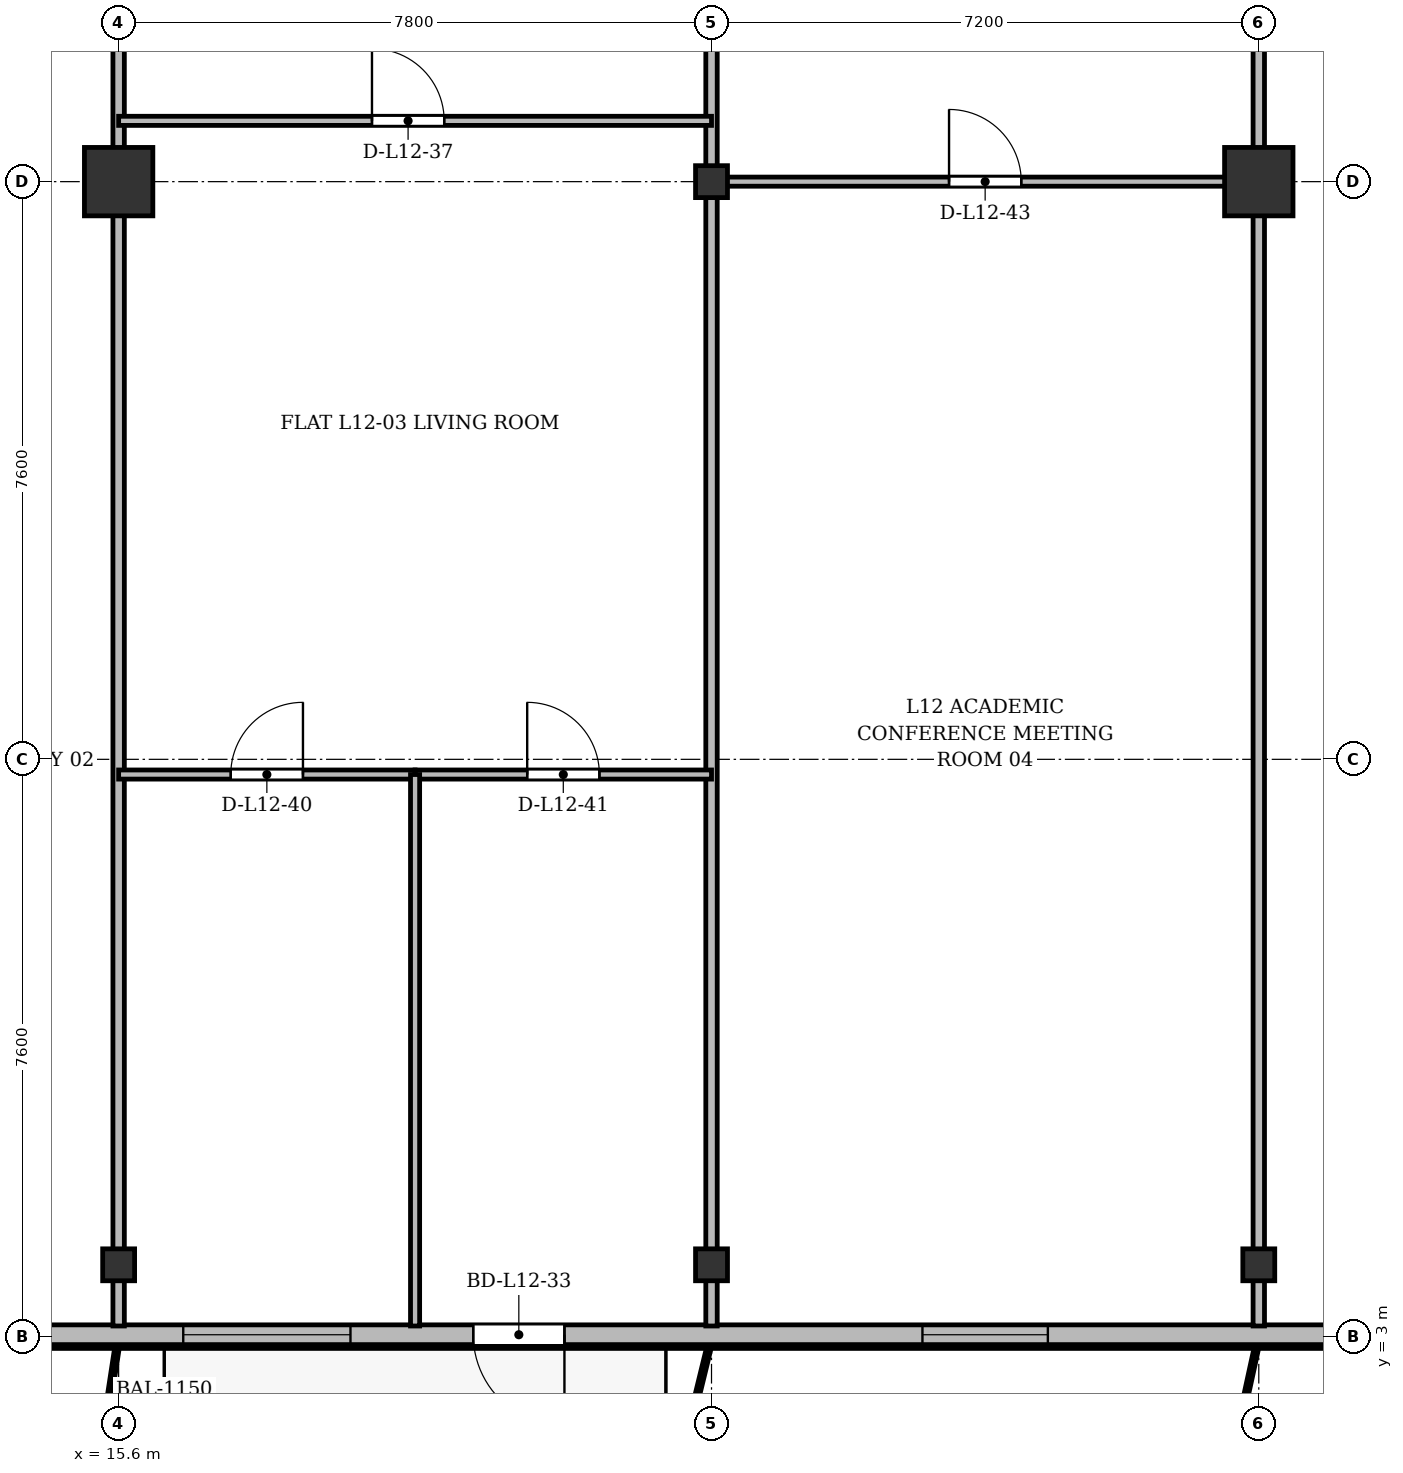
"""IFC4 building model, lengths in metres.
Left out: names, types, materials, properties, quantities, classifications, styles, units other than length and angle.
Written with IfcOpenShell. Run it as: python <this file> out.ifc"""

import sys

from ifc_helpers import new_model, si_unit, direction, frame, frame_2d, origin, origin_2d, place, context, subcontext, project, spatial, rectangle, i_section, extrude, source, transform, mapped, element, fill, save


model = new_model("IFC4")
c1 = context("Model", 3, precision=1e-05, world=origin(), true_north=direction((0.0, 1.0)))
c2 = subcontext(c1, "Body", "Model", "MODEL_VIEW")
j1 = project(units=[si_unit("LENGTHUNIT", "METRE"), si_unit("PLANEANGLEUNIT", "RADIAN")], contexts=[c1])
p1 = place(None, origin())
s1 = spatial("IfcSite", under=j1, at=p1, CompositionType="ELEMENT")
p2 = place(p1, origin())
s2 = spatial("IfcBuilding", under=s1, at=p2, CompositionType="ELEMENT")
p3 = place(p2, frame((0.0, 0.0, 48.7)))
s3 = spatial("IfcBuildingStorey", under=s2, at=p3, CompositionType="ELEMENT", Elevation=48.7)
m1 = source(origin(), c2, "Body", "SweptSolid", [
    extrude(i_section(OverallWidth=0.42, OverallDepth=0.42, WebThickness=0.026, FlangeThickness=0.04, at=origin_2d()), origin(), (0.0, 0.0, 1.0), 3.6),
])
p4 = place(p3, frame((15.6, 3.95, 0.0), z_axis=(0.0, 0.0, 1.0), x_axis=(1.0, 0.0, 0.0)))
e1 = element("IfcColumn", 1, at=p4, inside=s3, PredefinedType="COLUMN", context=c2, shape_type="MappedRepresentation", body=[
    mapped(m1, transform((0.0, 0.0, 0.0), x_axis=(1.0, 0.0, 0.0), y_axis=(0.0, 1.0, 0.0), z_axis=(0.0, 0.0, 1.0), scale=1.0)),
])
m2 = source(origin(), c2, "Body", "SweptSolid", [
    extrude(rectangle(XDim=0.9, YDim=0.9, at=origin_2d()), origin(), (0.0, 0.0, 1.0), 3.6),
])
p5 = place(p3, frame((15.6, 18.2, 0.0), z_axis=(0.0, 0.0, 1.0), x_axis=(1.0, 0.0, 0.0)))
e2 = element("IfcColumn", 2, at=p5, inside=s3, PredefinedType="COLUMN", context=c2, shape_type="MappedRepresentation", body=[
    mapped(m2, transform((0.0, 0.0, 0.0), x_axis=(1.0, 0.0, 0.0), y_axis=(0.0, 1.0, 0.0), z_axis=(0.0, 0.0, 1.0), scale=1.0)),
])
for number, where, z_axis, x_axis in (
    (3, (23.4, 3.95, 0.0), (0.0, 0.0, 1.0), (1.0, 0.0, 0.0)),
    (4, (23.4, 18.2, 0.0), (0.0, 0.0, 1.0), (1.0, 0.0, 0.0)),
    (5, (30.6, 3.95, 0.0), (0.0, 0.0, 1.0), (1.0, 0.0, 0.0)),
):
    element("IfcColumn", number, at=place(p3, frame(where, z_axis=z_axis, x_axis=x_axis)), inside=s3, PredefinedType="COLUMN", context=c2, shape_type="MappedRepresentation", body=[
        mapped(m1, transform((0.0, 0.0, 0.0), x_axis=(1.0, 0.0, 0.0), y_axis=(0.0, 1.0, 0.0), z_axis=(0.0, 0.0, 1.0), scale=1.0)),
    ])
p6 = place(p3, frame((30.6, 18.2, 0.0), z_axis=(0.0, 0.0, 1.0), x_axis=(1.0, 0.0, 0.0)))
e6 = element("IfcColumn", 6, at=p6, inside=s3, PredefinedType="COLUMN", context=c2, shape_type="MappedRepresentation", body=[
    mapped(m2, transform((0.0, 0.0, 0.0), x_axis=(1.0, 0.0, 0.0), y_axis=(0.0, 1.0, 0.0), z_axis=(0.0, 0.0, 1.0), scale=1.0)),
])
p7 = place(p3, frame((66.9, 3.03, 0.0), z_axis=(0.0, 0.0, 1.0), x_axis=(-1.0, 0.0, 0.0)))
e7 = element("IfcWall", 7, at=p7, inside=s3, PredefinedType="SOLIDWALL", context=c2, shape_type="SweptSolid", body=[
    extrude(rectangle(XDim=59.4, YDim=0.26, at=frame_2d((29.7, 0.0))), origin(), (0.0, 0.0, 1.0), 3.34),
])
p8 = place(p7, frame((0.745, 0.0, 0.9)))
e8 = element("IfcOpeningElement", 8, at=p8, cuts=e7, PredefinedType="OPENING", context=c2, shape_type="SweptSolid", body=[
    extrude(rectangle(XDim=1.5, YDim=1.75, at=frame_2d((0.75, 0.875))), frame((0.0, 0.14, 0.0), z_axis=(0.0, -1.0, 0.0), x_axis=(1.0, 0.0, 0.0)), (0.0, 0.0, 1.0), 0.28),
])
p9 = place(p7, frame((4.5, 0.0, 0.9)))
e9 = element("IfcOpeningElement", 9, at=p9, cuts=e7, PredefinedType="OPENING", context=c2, shape_type="SweptSolid", body=[
    extrude(rectangle(XDim=2.0, YDim=1.95, at=frame_2d((1.0, 0.975))), frame((0.0, 0.14, 0.0), z_axis=(0.0, -1.0, 0.0), x_axis=(1.0, 0.0, 0.0)), (0.0, 0.0, 1.0), 0.28),
])
p10 = place(p7, frame((11.175, 0.0, 0.9)))
e10 = element("IfcOpeningElement", 10, at=p10, cuts=e7, PredefinedType="OPENING", context=c2, shape_type="SweptSolid", body=[
    extrude(rectangle(XDim=1.65, YDim=1.85, at=frame_2d((0.825, 0.925))), frame((0.0, 0.14, 0.0), z_axis=(0.0, -1.0, 0.0), x_axis=(1.0, 0.0, 0.0)), (0.0, 0.0, 1.0), 0.28),
])
p11 = place(p7, frame((17.007, 0.0, 0.0)))
e11 = element("IfcOpeningElement", 11, at=p11, cuts=e7, PredefinedType="OPENING", context=c2, shape_type="SweptSolid", body=[
    extrude(rectangle(XDim=1.2, YDim=2.2, at=frame_2d((0.6, 1.1))), frame((0.0, 0.14, 0.0), z_axis=(0.0, -1.0, 0.0), x_axis=(1.0, 0.0, 0.0)), (0.0, 0.0, 1.0), 0.28),
])
p12 = place(p7, frame((20.2, 0.0, 0.9)))
e12 = element("IfcOpeningElement", 12, at=p12, cuts=e7, PredefinedType="OPENING", context=c2, shape_type="SweptSolid", body=[
    extrude(rectangle(XDim=2.2, YDim=1.8, at=frame_2d((1.1, 0.9))), frame((0.0, 0.14, 0.0), z_axis=(0.0, -1.0, 0.0), x_axis=(1.0, 0.0, 0.0)), (0.0, 0.0, 1.0), 0.28),
])
p13 = place(p7, frame((24.75, 0.0, 0.9)))
e13 = element("IfcOpeningElement", 13, at=p13, cuts=e7, PredefinedType="OPENING", context=c2, shape_type="SweptSolid", body=[
    extrude(rectangle(XDim=1.5, YDim=1.75, at=frame_2d((0.75, 0.875))), frame((0.0, 0.14, 0.0), z_axis=(0.0, -1.0, 0.0), x_axis=(1.0, 0.0, 0.0)), (0.0, 0.0, 1.0), 0.28),
])
p14 = place(p7, frame((31.1, 0.0, 0.9)))
e14 = element("IfcOpeningElement", 14, at=p14, cuts=e7, PredefinedType="OPENING", context=c2, shape_type="SweptSolid", body=[
    extrude(rectangle(XDim=2.0, YDim=1.95, at=frame_2d((1.0, 0.975))), frame((0.0, 0.14, 0.0), z_axis=(0.0, -1.0, 0.0), x_axis=(1.0, 0.0, 0.0)), (0.0, 0.0, 1.0), 0.28),
])
p15 = place(p7, frame((39.075, 0.0, 0.9)))
e15 = element("IfcOpeningElement", 15, at=p15, cuts=e7, PredefinedType="OPENING", context=c2, shape_type="SweptSolid", body=[
    extrude(rectangle(XDim=1.65, YDim=1.85, at=frame_2d((0.825, 0.925))), frame((0.0, 0.14, 0.0), z_axis=(0.0, -1.0, 0.0), x_axis=(1.0, 0.0, 0.0)), (0.0, 0.0, 1.0), 0.28),
])
p16 = place(p7, frame((45.435, 0.0, 0.0)))
e16 = element("IfcOpeningElement", 16, at=p16, cuts=e7, PredefinedType="OPENING", context=c2, shape_type="SweptSolid", body=[
    extrude(rectangle(XDim=1.2, YDim=2.2, at=frame_2d((0.6, 1.1))), frame((0.0, 0.14, 0.0), z_axis=(0.0, -1.0, 0.0), x_axis=(1.0, 0.0, 0.0)), (0.0, 0.0, 1.0), 0.28),
])
p17 = place(p7, frame((48.25, 0.0, 0.9)))
e17 = element("IfcOpeningElement", 17, at=p17, cuts=e7, PredefinedType="OPENING", context=c2, shape_type="SweptSolid", body=[
    extrude(rectangle(XDim=2.2, YDim=1.8, at=frame_2d((1.1, 0.9))), frame((0.0, 0.14, 0.0), z_axis=(0.0, -1.0, 0.0), x_axis=(1.0, 0.0, 0.0)), (0.0, 0.0, 1.0), 0.28),
])
p18 = place(p7, frame((52.35, 0.0, 0.9)))
e18 = element("IfcOpeningElement", 18, at=p18, cuts=e7, PredefinedType="OPENING", context=c2, shape_type="SweptSolid", body=[
    extrude(rectangle(XDim=1.5, YDim=1.75, at=frame_2d((0.75, 0.875))), frame((0.0, 0.14, 0.0), z_axis=(0.0, -1.0, 0.0), x_axis=(1.0, 0.0, 0.0)), (0.0, 0.0, 1.0), 0.28),
])
p19 = place(p7, frame((56.105, 0.0, 0.9)))
e19 = element("IfcOpeningElement", 19, at=p19, cuts=e7, PredefinedType="OPENING", context=c2, shape_type="SweptSolid", body=[
    extrude(rectangle(XDim=2.0, YDim=1.95, at=frame_2d((1.0, 0.975))), frame((0.0, 0.14, 0.0), z_axis=(0.0, -1.0, 0.0), x_axis=(1.0, 0.0, 0.0)), (0.0, 0.0, 1.0), 0.28),
])
for number, where, z_axis, x_axis in (
    (20, (15.6, 3.145, 0.0), (0.0, 0.0, 1.0), (0.0, 1.0, 0.0)),
    (21, (23.4, 3.145, 0.0), (0.0, 0.0, 1.0), (0.0, 1.0, 0.0)),
    (22, (30.6, 3.145, 0.0), (0.0, 0.0, 1.0), (0.0, 1.0, 0.0)),
):
    element("IfcWall", number, at=place(p3, frame(where, z_axis=z_axis, x_axis=x_axis)), inside=s3, PredefinedType="PARTITIONING", context=c2, shape_type="SweptSolid", body=[
        extrude(rectangle(XDim=24.455, YDim=0.15, at=frame_2d((12.228, 0.0))), origin(), (0.0, 0.0, 1.0), 2.752),
    ])
p20 = place(p3, frame((15.6, 19.0, 0.0), z_axis=(0.0, 0.0, 1.0), x_axis=(1.0, 0.0, 0.0)))
e23 = element("IfcWall", 23, at=p20, inside=s3, PredefinedType="PARTITIONING", context=c2, shape_type="SweptSolid", body=[
    extrude(rectangle(XDim=7.8, YDim=0.12, at=frame_2d((3.9, 0.0))), origin(), (0.0, 0.0, 1.0), 2.752),
])
p21 = place(p20, frame((3.333, 0.0, 0.0)))
e24 = element("IfcOpeningElement", 24, at=p21, cuts=e23, PredefinedType="OPENING", context=c2, shape_type="SweptSolid", body=[
    extrude(rectangle(XDim=0.95, YDim=2.15, at=frame_2d((0.475, 1.075))), frame((0.0, 0.07, 0.0), z_axis=(0.0, -1.0, 0.0), x_axis=(1.0, 0.0, 0.0)), (0.0, 0.0, 1.0), 0.14),
])
p22 = place(p3, frame((15.6, 10.4, 0.0), z_axis=(0.0, 0.0, 1.0), x_axis=(1.0, 0.0, 0.0)))
e25 = element("IfcWall", 25, at=p22, inside=s3, PredefinedType="PARTITIONING", context=c2, shape_type="SweptSolid", body=[
    extrude(rectangle(XDim=3.9, YDim=0.12, at=frame_2d((1.95, 0.0))), origin(), (0.0, 0.0, 1.0), 2.752),
])
p23 = place(p22, frame((1.475, 0.0, 0.0)))
e26 = element("IfcOpeningElement", 26, at=p23, cuts=e25, PredefinedType="OPENING", context=c2, shape_type="SweptSolid", body=[
    extrude(rectangle(XDim=0.95, YDim=2.15, at=frame_2d((0.475, 1.075))), frame((0.0, 0.07, 0.0), z_axis=(0.0, -1.0, 0.0), x_axis=(1.0, 0.0, 0.0)), (0.0, 0.0, 1.0), 0.14),
])
p24 = place(p3, frame((19.5, 10.4, 0.0), z_axis=(0.0, 0.0, 1.0), x_axis=(1.0, 0.0, 0.0)))
e27 = element("IfcWall", 27, at=p24, inside=s3, PredefinedType="PARTITIONING", context=c2, shape_type="SweptSolid", body=[
    extrude(rectangle(XDim=3.9, YDim=0.12, at=frame_2d((1.95, 0.0))), origin(), (0.0, 0.0, 1.0), 2.752),
])
p25 = place(p24, frame((1.475, 0.0, 0.0)))
e28 = element("IfcOpeningElement", 28, at=p25, cuts=e27, PredefinedType="OPENING", context=c2, shape_type="SweptSolid", body=[
    extrude(rectangle(XDim=0.95, YDim=2.15, at=frame_2d((0.475, 1.075))), frame((0.0, 0.07, 0.0), z_axis=(0.0, -1.0, 0.0), x_axis=(1.0, 0.0, 0.0)), (0.0, 0.0, 1.0), 0.14),
])
p26 = place(p3, frame((19.5, 3.145, 0.0), z_axis=(0.0, 0.0, 1.0), x_axis=(0.0, 1.0, 0.0)))
e29 = element("IfcWall", 29, at=p26, inside=s3, PredefinedType="PARTITIONING", context=c2, shape_type="SweptSolid", body=[
    extrude(rectangle(XDim=7.255, YDim=0.12, at=frame_2d((3.627, 0.0))), origin(), (0.0, 0.0, 1.0), 2.69),
])
p27 = place(p3, frame((23.4, 18.2, 0.0), z_axis=(0.0, 0.0, 1.0), x_axis=(1.0, 0.0, 0.0)))
e30 = element("IfcWall", 30, at=p27, inside=s3, PredefinedType="PARTITIONING", context=c2, shape_type="SweptSolid", body=[
    extrude(rectangle(XDim=7.2, YDim=0.12, at=frame_2d((3.6, 0.0))), origin(), (0.0, 0.0, 1.0), 2.69),
])
p28 = place(p27, frame((3.125, 0.0, 0.0)))
e31 = element("IfcOpeningElement", 31, at=p28, cuts=e30, PredefinedType="OPENING", context=c2, shape_type="SweptSolid", body=[
    extrude(rectangle(XDim=0.95, YDim=2.15, at=frame_2d((0.475, 1.075))), frame((0.0, 0.07, 0.0), z_axis=(0.0, -1.0, 0.0), x_axis=(1.0, 0.0, 0.0)), (0.0, 0.0, 1.0), 0.14),
])
m3 = source(origin(), c2, "Body", "SweptSolid", [
    extrude(rectangle(XDim=1.65, YDim=1.85, at=frame_2d((0.825, 0.925))), frame((0.0, 0.03, 0.0), z_axis=(0.0, -1.0, 0.0), x_axis=(1.0, 0.0, 0.0)), (0.0, 0.0, 1.0), 0.06),
])
p29 = place(p15, origin())
e32 = element("IfcWindow", 32, at=p29, inside=s3, PartitioningType="SINGLE_PANEL", PredefinedType="WINDOW", context=c2, shape_type="MappedRepresentation", body=[
    mapped(m3, transform((0.0, 0.0, 0.0), x_axis=(1.0, 0.0, 0.0), y_axis=(0.0, 1.0, 0.0), z_axis=(0.0, 0.0, 1.0), scale=1.0)),
])
fill(e15, e32)
m4 = source(origin(), c2, "Body", "SweptSolid", [
    extrude(rectangle(XDim=1.2, YDim=2.2, at=frame_2d((0.6, 1.1))), frame((0.0, 0.025, 0.0), z_axis=(0.0, -1.0, 0.0), x_axis=(1.0, 0.0, 0.0)), (0.0, 0.0, 1.0), 0.05),
])
p30 = place(p16, origin())
e33 = element("IfcDoor", 33, at=p30, inside=s3, OperationType="SINGLE_SWING_LEFT", PredefinedType="DOOR", context=c2, shape_type="MappedRepresentation", body=[
    mapped(m4, transform((0.0, 0.0, 0.0), x_axis=(1.0, 0.0, 0.0), y_axis=(0.0, 1.0, 0.0), z_axis=(0.0, 0.0, 1.0), scale=1.0)),
])
fill(e16, e33)
m5 = source(origin(), c2, "Body", "SweptSolid", [
    extrude(rectangle(XDim=2.2, YDim=1.8, at=frame_2d((1.1, 0.9))), frame((0.0, 0.03, 0.0), z_axis=(0.0, -1.0, 0.0), x_axis=(1.0, 0.0, 0.0)), (0.0, 0.0, 1.0), 0.06),
])
p31 = place(p17, origin())
e34 = element("IfcWindow", 34, at=p31, inside=s3, PartitioningType="SINGLE_PANEL", PredefinedType="WINDOW", context=c2, shape_type="MappedRepresentation", body=[
    mapped(m5, transform((0.0, 0.0, 0.0), x_axis=(1.0, 0.0, 0.0), y_axis=(0.0, 1.0, 0.0), z_axis=(0.0, 0.0, 1.0), scale=1.0)),
])
fill(e17, e34)
m6 = source(origin(), c2, "Body", "SweptSolid", [
    extrude(rectangle(XDim=0.95, YDim=2.15, at=frame_2d((0.475, 1.075))), frame((0.0, 0.025, 0.0), z_axis=(0.0, -1.0, 0.0), x_axis=(1.0, 0.0, 0.0)), (0.0, 0.0, 1.0), 0.05),
])
p32 = place(p21, origin())
e35 = element("IfcDoor", 35, at=p32, inside=s3, OperationType="SINGLE_SWING_LEFT", PredefinedType="DOOR", context=c2, shape_type="MappedRepresentation", body=[
    mapped(m6, transform((0.0, 0.0, 0.0), x_axis=(1.0, 0.0, 0.0), y_axis=(0.0, 1.0, 0.0), z_axis=(0.0, 0.0, 1.0), scale=1.0)),
])
fill(e24, e35)
p33 = place(p23, origin())
e36 = element("IfcDoor", 36, at=p33, inside=s3, OperationType="SINGLE_SWING_RIGHT", PredefinedType="DOOR", context=c2, shape_type="MappedRepresentation", body=[
    mapped(m6, transform((0.0, 0.0, 0.0), x_axis=(1.0, 0.0, 0.0), y_axis=(0.0, 1.0, 0.0), z_axis=(0.0, 0.0, 1.0), scale=1.0)),
])
fill(e26, e36)
p34 = place(p25, origin())
e37 = element("IfcDoor", 37, at=p34, inside=s3, OperationType="SINGLE_SWING_LEFT", PredefinedType="DOOR", context=c2, shape_type="MappedRepresentation", body=[
    mapped(m6, transform((0.0, 0.0, 0.0), x_axis=(1.0, 0.0, 0.0), y_axis=(0.0, 1.0, 0.0), z_axis=(0.0, 0.0, 1.0), scale=1.0)),
])
fill(e28, e37)
p35 = place(p28, origin())
e38 = element("IfcDoor", 38, at=p35, inside=s3, OperationType="SINGLE_SWING_LEFT", PredefinedType="DOOR", context=c2, shape_type="MappedRepresentation", body=[
    mapped(m6, transform((0.0, 0.0, 0.0), x_axis=(1.0, 0.0, 0.0), y_axis=(0.0, 1.0, 0.0), z_axis=(0.0, 0.0, 1.0), scale=1.0)),
])
fill(e31, e38)
save(model, sys.argv[1])
